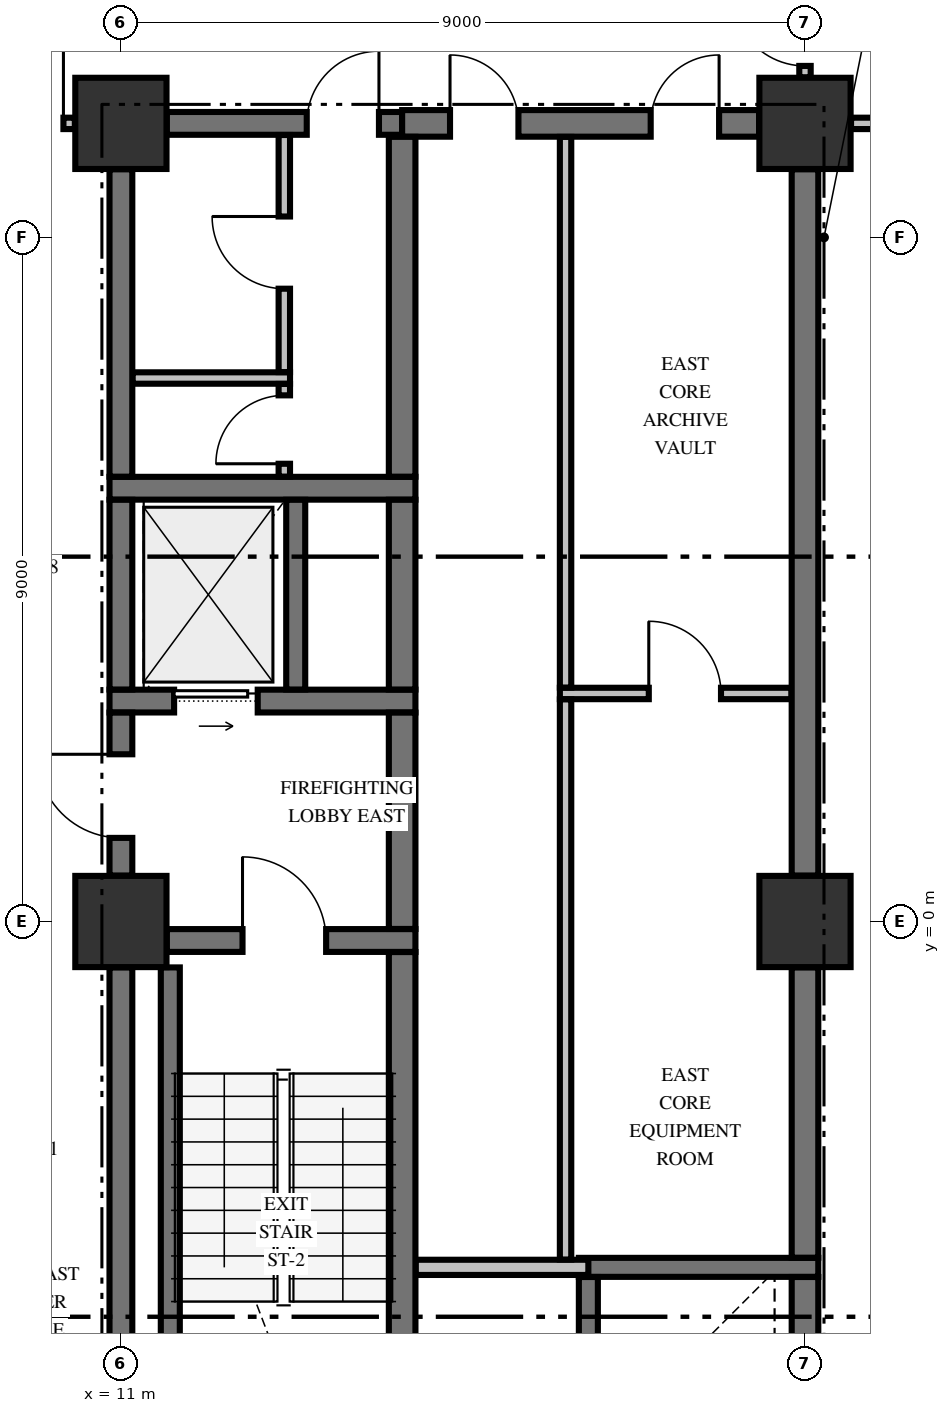
"""IFC4 building model, lengths in metres.
Left out: names, types, materials, properties, quantities, classifications, styles, units other than length and angle.
Written with IfcOpenShell. Run it as: python <this file> out.ifc"""

import sys

from ifc_helpers import new_model, si_unit, direction, frame, frame_2d, origin, origin_2d, place, context, subcontext, project, spatial, rectangle, extrude, element, fill, save


model = new_model("IFC4")
c1 = context("Model", 3, precision=1e-05, world=origin(), true_north=direction((0.0, 1.0)))
c2 = subcontext(c1, "Body", "Model", "MODEL_VIEW")
j1 = project(units=[si_unit("LENGTHUNIT", "METRE"), si_unit("PLANEANGLEUNIT", "RADIAN")], contexts=[c1])
p1 = place(None, origin())
s1 = spatial("IfcSite", under=j1, at=p1, CompositionType="ELEMENT")
p2 = place(p1, origin())
s2 = spatial("IfcBuilding", under=s1, at=p2, CompositionType="ELEMENT")
p3 = place(p2, frame((0.0, 0.0, 27.2)))
s3 = spatial("IfcBuildingStorey", under=s2, at=p3, CompositionType="ELEMENT", Elevation=27.2)
for number, where, z_axis, x_axis in (
    (1, (11.0, 0.0, -0.45), (0.0, 0.0, 1.0), (1.0, 0.0, 0.0)),
    (2, (11.0, 10.5, -0.45), (0.0, 0.0, 1.0), (1.0, 0.0, 0.0)),
    (3, (20.0, 10.5, -0.45), (0.0, 0.0, 1.0), (1.0, 0.0, 0.0)),
    (4, (20.0, 0.0, -0.45), (0.0, 0.0, 1.0), (1.0, 0.0, 0.0)),
):
    element("IfcColumn", number, at=place(p3, frame(where, z_axis=z_axis, x_axis=x_axis)), inside=s3, PredefinedType="COLUMN", context=c2, shape_type="SweptSolid", body=[
        extrude(rectangle(XDim=1.2, YDim=1.2, at=origin_2d()), origin(), (0.0, 0.0, 1.0), 3.77),
    ])
p4 = place(p3, frame((17.025, -4.55, 0.0), z_axis=(0.0, 0.0, 1.0), x_axis=(1.0, 0.0, 0.0)))
e5 = element("IfcWall", 5, at=p4, inside=s3, PredefinedType="SOLIDWALL", context=c2, shape_type="SweptSolid", body=[
    extrude(rectangle(XDim=3.15, YDim=0.25, at=frame_2d((1.575, 0.0))), origin(), (0.0, 0.0, 1.0), 3.32),
])
p5 = place(p3, frame((11.604, -0.25, 0.0), z_axis=(0.0, 0.0, 1.0), x_axis=(1.0, 0.0, 0.0)))
e6 = element("IfcWall", 6, at=p5, inside=s3, PredefinedType="SHEAR", context=c2, shape_type="SweptSolid", body=[
    extrude(rectangle(XDim=3.271, YDim=0.3, at=frame_2d((1.635, 0.0))), origin(), (0.0, 0.0, 1.0), 3.32),
])
p6 = place(p5, frame((0.996, 0.0, 0.0)))
e7 = element("IfcOpeningElement", 7, at=p6, cuts=e6, PredefinedType="OPENING", context=c2, shape_type="SweptSolid", body=[
    extrude(rectangle(XDim=1.1, YDim=2.15, at=frame_2d((0.55, 1.075))), frame((0.0, 0.16, 0.0), z_axis=(0.0, -1.0, 0.0), x_axis=(1.0, 0.0, 0.0)), (0.0, 0.0, 1.0), 0.32),
])
p7 = place(p3, frame((10.85, 2.9, 0.0), z_axis=(0.0, 0.0, 1.0), x_axis=(1.0, 0.0, 0.0)))
e8 = element("IfcWall", 8, at=p7, inside=s3, PredefinedType="SHEAR", context=c2, shape_type="SweptSolid", body=[
    extrude(rectangle(XDim=4.025, YDim=0.3, at=frame_2d((2.012, 0.0))), origin(), (0.0, 0.0, 1.0), 3.32),
])
p8 = place(p7, frame((0.85, 0.0, 0.0)))
e9 = element("IfcOpeningElement", 9, at=p8, cuts=e8, PredefinedType="OPENING", context=c2, shape_type="SweptSolid", body=[
    extrude(rectangle(XDim=1.1, YDim=2.2, at=frame_2d((0.55, 1.1))), frame((0.0, 0.16, 0.0), z_axis=(0.0, -1.0, 0.0), x_axis=(1.0, 0.0, 0.0)), (0.0, 0.0, 1.0), 0.32),
])
p9 = place(p3, frame((10.85, 5.7, 0.0), z_axis=(0.0, 0.0, 1.0), x_axis=(1.0, 0.0, 0.0)))
e10 = element("IfcWall", 10, at=p9, inside=s3, PredefinedType="SHEAR", context=c2, shape_type="SweptSolid", body=[
    extrude(rectangle(XDim=4.025, YDim=0.3, at=frame_2d((2.012, 0.0))), origin(), (0.0, 0.0, 1.0), 3.32),
])
p10 = place(p3, frame((11.604, 10.5, 0.0), z_axis=(0.0, 0.0, 1.0), x_axis=(1.0, 0.0, 0.0)))
e11 = element("IfcWall", 11, at=p10, inside=s3, PredefinedType="SHEAR", context=c2, shape_type="SweptSolid", body=[
    extrude(rectangle(XDim=3.096, YDim=0.3, at=frame_2d((1.548, 0.0))), origin(), (0.0, 0.0, 1.0), 3.32),
])
p11 = place(p10, frame((1.841, 0.0, 0.0)))
e12 = element("IfcOpeningElement", 12, at=p11, cuts=e11, PredefinedType="OPENING", context=c2, shape_type="SweptSolid", body=[
    extrude(rectangle(XDim=0.95, YDim=2.15, at=frame_2d((0.475, 1.075))), frame((0.0, 0.16, 0.0), z_axis=(0.0, -1.0, 0.0), x_axis=(1.0, 0.0, 0.0)), (0.0, 0.0, 1.0), 0.32),
])
p12 = place(p3, frame((14.7, 10.5, 0.0), z_axis=(0.0, 0.0, 1.0), x_axis=(1.0, 0.0, 0.0)))
e13 = element("IfcWall", 13, at=p12, inside=s3, PredefinedType="SHEAR", context=c2, shape_type="SweptSolid", body=[
    extrude(rectangle(XDim=4.696, YDim=0.35, at=frame_2d((2.348, 0.0))), origin(), (0.0, 0.0, 1.0), 3.32),
])
p13 = place(p12, frame((0.63, 0.0, 0.0)))
e14 = element("IfcOpeningElement", 14, at=p13, cuts=e13, PredefinedType="OPENING", context=c2, shape_type="SweptSolid", body=[
    extrude(rectangle(XDim=0.9, YDim=2.15, at=frame_2d((0.45, 1.075))), frame((0.0, 0.185, 0.0), z_axis=(0.0, -1.0, 0.0), x_axis=(1.0, 0.0, 0.0)), (0.0, 0.0, 1.0), 0.37),
])
p14 = place(p12, frame((3.27, 0.0, 0.0)))
e15 = element("IfcOpeningElement", 15, at=p14, cuts=e13, PredefinedType="OPENING", context=c2, shape_type="SweptSolid", body=[
    extrude(rectangle(XDim=0.9, YDim=2.15, at=frame_2d((0.45, 1.075))), frame((0.0, 0.185, 0.0), z_axis=(0.0, -1.0, 0.0), x_axis=(1.0, 0.0, 0.0)), (0.0, 0.0, 1.0), 0.37),
])
p15 = place(p3, frame((14.878, -4.55, 0.0), z_axis=(0.0, 0.0, 1.0), x_axis=(1.0, 0.0, 0.0)))
e16 = element("IfcWall", 16, at=p15, inside=s3, PredefinedType="PARTITIONING", context=c2, shape_type="SweptSolid", body=[
    extrude(rectangle(XDim=2.272, YDim=0.2, at=frame_2d((1.136, 0.0))), origin(), (0.0, 0.0, 1.0), 3.32),
])
p16 = place(p3, frame((16.775, 3.0, 0.0), z_axis=(0.0, 0.0, 1.0), x_axis=(1.0, 0.0, 0.0)))
e17 = element("IfcWall", 17, at=p16, inside=s3, PredefinedType="PARTITIONING", context=c2, shape_type="SweptSolid", body=[
    extrude(rectangle(XDim=3.047, YDim=0.15, at=frame_2d((1.523, 0.0))), origin(), (0.0, 0.0, 1.0), 3.32),
])
p17 = place(p16, frame((1.17, 0.0, 0.0)))
e18 = element("IfcOpeningElement", 18, at=p17, cuts=e17, PredefinedType="OPENING", context=c2, shape_type="SweptSolid", body=[
    extrude(rectangle(XDim=0.95, YDim=2.15, at=frame_2d((0.475, 1.075))), frame((0.0, 0.085, 0.0), z_axis=(0.0, -1.0, 0.0), x_axis=(1.0, 0.0, 0.0)), (0.0, 0.0, 1.0), 0.17),
])
p18 = place(p3, frame((11.153, 7.15, 0.0), z_axis=(0.0, 0.0, 1.0), x_axis=(1.0, 0.0, 0.0)))
e19 = element("IfcWall", 19, at=p18, inside=s3, PredefinedType="PARTITIONING", context=c2, shape_type="SweptSolid", body=[
    extrude(rectangle(XDim=2.072, YDim=0.15, at=frame_2d((1.036, 0.0))), origin(), (0.0, 0.0, 1.0), 3.32),
])
p19 = place(p3, frame((-10.394, 10.5, 0.0), z_axis=(0.0, 0.0, 1.0), x_axis=(1.0, 0.0, 0.0)))
e20 = element("IfcWall", 20, at=p19, inside=s3, PredefinedType="PARTITIONING", context=c2, shape_type="SweptSolid", body=[
    extrude(rectangle(XDim=20.788, YDim=0.15, at=frame_2d((10.394, 0.0))), origin(), (0.0, 0.0, 1.0), 3.32),
])
p20 = place(p19, frame((0.15, 0.0, 0.0)))
e21 = element("IfcOpeningElement", 21, at=p20, cuts=e20, PredefinedType="OPENING", context=c2, shape_type="SweptSolid", body=[
    extrude(rectangle(XDim=1.05, YDim=2.15, at=frame_2d((0.525, 1.075))), frame((0.0, 0.085, 0.0), z_axis=(0.0, -1.0, 0.0), x_axis=(1.0, 0.0, 0.0)), (0.0, 0.0, 1.0), 0.17),
])
p21 = place(p19, frame((19.588, 0.0, 0.0)))
e22 = element("IfcOpeningElement", 22, at=p21, cuts=e20, PredefinedType="OPENING", context=c2, shape_type="SweptSolid", body=[
    extrude(rectangle(XDim=1.05, YDim=2.15, at=frame_2d((0.525, 1.075))), frame((0.0, 0.085, 0.0), z_axis=(0.0, -1.0, 0.0), x_axis=(1.0, 0.0, 0.0)), (0.0, 0.0, 1.0), 0.17),
])
p22 = place(p3, frame((20.606, 10.5, 0.0), z_axis=(0.0, 0.0, 1.0), x_axis=(1.0, 0.0, 0.0)))
e23 = element("IfcWall", 23, at=p22, inside=s3, PredefinedType="PARTITIONING", context=c2, shape_type="SweptSolid", body=[
    extrude(rectangle(XDim=8.229, YDim=0.15, at=frame_2d((4.115, 0.0))), origin(), (0.0, 0.0, 1.0), 3.32),
])
p23 = place(p22, frame((3.394, 0.0, 0.0)))
e24 = element("IfcOpeningElement", 24, at=p23, cuts=e23, PredefinedType="OPENING", context=c2, shape_type="SweptSolid", body=[
    extrude(rectangle(XDim=1.0, YDim=2.15, at=frame_2d((0.5, 1.075))), frame((0.0, 0.085, 0.0), z_axis=(0.0, -1.0, 0.0), x_axis=(1.0, 0.0, 0.0)), (0.0, 0.0, 1.0), 0.17),
])
p24 = place(p3, frame((11.0, -9.346, 0.0), z_axis=(0.0, 0.0, 1.0), x_axis=(0.0, 1.0, 0.0)))
e25 = element("IfcWall", 25, at=p24, inside=s3, PredefinedType="SHEAR", context=c2, shape_type="SweptSolid", body=[
    extrude(rectangle(XDim=8.742, YDim=0.3, at=frame_2d((4.371, 0.0))), origin(), (0.0, 0.0, 1.0), 3.32),
])
p25 = place(p3, frame((11.0, 0.604, 0.0), z_axis=(0.0, 0.0, 1.0), x_axis=(0.0, 1.0, 0.0)))
e26 = element("IfcWall", 26, at=p25, inside=s3, PredefinedType="SHEAR", context=c2, shape_type="SweptSolid", body=[
    extrude(rectangle(XDim=2.144, YDim=0.3, at=frame_2d((1.072, 0.0))), origin(), (0.0, 0.0, 1.0), 3.32),
])
p26 = place(p25, frame((0.496, 0.0, 0.0)))
e27 = element("IfcOpeningElement", 27, at=p26, cuts=e26, PredefinedType="OPENING", context=c2, shape_type="SweptSolid", body=[
    extrude(rectangle(XDim=1.1, YDim=2.15, at=frame_2d((0.55, 1.075))), frame((0.0, 0.16, 0.0), z_axis=(0.0, -1.0, 0.0), x_axis=(1.0, 0.0, 0.0)), (0.0, 0.0, 1.0), 0.32),
])
p27 = place(p3, frame((11.0, 3.052, 0.0), z_axis=(0.0, 0.0, 1.0), x_axis=(0.0, 1.0, 0.0)))
e28 = element("IfcWall", 28, at=p27, inside=s3, PredefinedType="SHEAR", context=c2, shape_type="SweptSolid", body=[
    extrude(rectangle(XDim=2.496, YDim=0.3, at=frame_2d((1.248, 0.0))), origin(), (0.0, 0.0, 1.0), 3.32),
])
p28 = place(p3, frame((11.0, 5.852, 0.0), z_axis=(0.0, 0.0, 1.0), x_axis=(0.0, 1.0, 0.0)))
e29 = element("IfcWall", 29, at=p28, inside=s3, PredefinedType="SHEAR", context=c2, shape_type="SweptSolid", body=[
    extrude(rectangle(XDim=4.044, YDim=0.3, at=frame_2d((2.022, 0.0))), origin(), (0.0, 0.0, 1.0), 3.32),
])
p29 = place(p3, frame((11.65, -9.346, 0.0), z_axis=(0.0, 0.0, 1.0), x_axis=(0.0, 1.0, 0.0)))
e30 = element("IfcWall", 30, at=p29, inside=s3, PredefinedType="SOLIDWALL", context=c2, shape_type="SweptSolid", body=[
    extrude(rectangle(XDim=8.742, YDim=0.25, at=frame_2d((4.371, 0.0))), origin(), (0.0, 0.0, 1.0), 3.32),
])
p30 = place(p3, frame((13.3, 3.052, 0.0), z_axis=(0.0, 0.0, 1.0), x_axis=(0.0, 1.0, 0.0)))
e31 = element("IfcWall", 31, at=p30, inside=s3, PredefinedType="SOLIDWALL", context=c2, shape_type="SweptSolid", body=[
    extrude(rectangle(XDim=2.496, YDim=0.25, at=frame_2d((1.248, 0.0))), origin(), (0.0, 0.0, 1.0), 3.32),
])
p31 = place(p3, frame((14.7, -9.773, 0.0), z_axis=(0.0, 0.0, 1.0), x_axis=(0.0, 1.0, 0.0)))
e32 = element("IfcWall", 32, at=p31, inside=s3, PredefinedType="SHEAR", context=c2, shape_type="SweptSolid", body=[
    extrude(rectangle(XDim=9.371, YDim=0.35, at=frame_2d((4.686, 0.0))), origin(), (0.0, 0.0, 1.0), 3.32),
])
p32 = place(p3, frame((14.7, -0.098, 0.0), z_axis=(0.0, 0.0, 1.0), x_axis=(0.0, 1.0, 0.0)))
e33 = element("IfcWall", 33, at=p32, inside=s3, PredefinedType="SHEAR", context=c2, shape_type="SweptSolid", body=[
    extrude(rectangle(XDim=2.846, YDim=0.35, at=frame_2d((1.423, 0.0))), origin(), (0.0, 0.0, 1.0), 3.32),
])
p33 = place(p3, frame((14.7, 3.052, 0.0), z_axis=(0.0, 0.0, 1.0), x_axis=(0.0, 1.0, 0.0)))
e34 = element("IfcWall", 34, at=p33, inside=s3, PredefinedType="SHEAR", context=c2, shape_type="SweptSolid", body=[
    extrude(rectangle(XDim=2.496, YDim=0.35, at=frame_2d((1.248, 0.0))), origin(), (0.0, 0.0, 1.0), 3.32),
])
p34 = place(p3, frame((14.7, 5.852, 0.0), z_axis=(0.0, 0.0, 1.0), x_axis=(0.0, 1.0, 0.0)))
e35 = element("IfcWall", 35, at=p34, inside=s3, PredefinedType="SHEAR", context=c2, shape_type="SweptSolid", body=[
    extrude(rectangle(XDim=4.471, YDim=0.35, at=frame_2d((2.235, 0.0))), origin(), (0.0, 0.0, 1.0), 3.32),
])
p35 = place(p3, frame((17.15, -6.923, 0.0), z_axis=(0.0, 0.0, 1.0), x_axis=(0.0, 1.0, 0.0)))
e36 = element("IfcWall", 36, at=p35, inside=s3, PredefinedType="SOLIDWALL", context=c2, shape_type="SweptSolid", body=[
    extrude(rectangle(XDim=2.246, YDim=0.25, at=frame_2d((1.123, 0.0))), origin(), (0.0, 0.0, 1.0), 3.32),
])
p36 = place(p3, frame((20.0, -6.923, 0.0), z_axis=(0.0, 0.0, 1.0), x_axis=(0.0, 1.0, 0.0)))
e37 = element("IfcWall", 37, at=p36, inside=s3, PredefinedType="SHEAR", context=c2, shape_type="SweptSolid", body=[
    extrude(rectangle(XDim=2.246, YDim=0.35, at=frame_2d((1.123, 0.0))), origin(), (0.0, 0.0, 1.0), 3.32),
])
p37 = place(p3, frame((20.0, -4.423, 0.0), z_axis=(0.0, 0.0, 1.0), x_axis=(0.0, 1.0, 0.0)))
e38 = element("IfcWall", 38, at=p37, inside=s3, PredefinedType="SHEAR", context=c2, shape_type="SweptSolid", body=[
    extrude(rectangle(XDim=3.819, YDim=0.35, at=frame_2d((1.91, 0.0))), origin(), (0.0, 0.0, 1.0), 3.32),
])
p38 = place(p3, frame((20.0, 0.604, 0.0), z_axis=(0.0, 0.0, 1.0), x_axis=(0.0, 1.0, 0.0)))
e39 = element("IfcWall", 39, at=p38, inside=s3, PredefinedType="SHEAR", context=c2, shape_type="SweptSolid", body=[
    extrude(rectangle(XDim=9.292, YDim=0.35, at=frame_2d((4.646, 0.0))), origin(), (0.0, 0.0, 1.0), 3.32),
])
p39 = place(p3, frame((13.15, 5.853, 0.0), z_axis=(0.0, 0.0, 1.0), x_axis=(0.0, 1.0, 0.0)))
e40 = element("IfcWall", 40, at=p39, inside=s3, PredefinedType="PARTITIONING", context=c2, shape_type="SweptSolid", body=[
    extrude(rectangle(XDim=1.219, YDim=0.15, at=frame_2d((0.609, 0.0))), origin(), (0.0, 0.0, 1.0), 3.32),
])
p40 = place(p39, frame((0.169, 0.0, 0.0)))
e41 = element("IfcOpeningElement", 41, at=p40, cuts=e40, PredefinedType="OPENING", context=c2, shape_type="SweptSolid", body=[
    extrude(rectangle(XDim=0.9, YDim=2.15, at=frame_2d((0.45, 1.075))), frame((0.0, 0.085, 0.0), z_axis=(0.0, -1.0, 0.0), x_axis=(1.0, 0.0, 0.0)), (0.0, 0.0, 1.0), 0.17),
])
p41 = place(p3, frame((13.15, 7.228, 0.0), z_axis=(0.0, 0.0, 1.0), x_axis=(0.0, 1.0, 0.0)))
e42 = element("IfcWall", 42, at=p41, inside=s3, PredefinedType="PARTITIONING", context=c2, shape_type="SweptSolid", body=[
    extrude(rectangle(XDim=3.119, YDim=0.15, at=frame_2d((1.56, 0.0))), origin(), (0.0, 0.0, 1.0), 3.32),
])
p42 = place(p41, frame((1.097, 0.0, 0.0)))
e43 = element("IfcOpeningElement", 43, at=p42, cuts=e42, PredefinedType="OPENING", context=c2, shape_type="SweptSolid", body=[
    extrude(rectangle(XDim=0.95, YDim=2.15, at=frame_2d((0.475, 1.075))), frame((0.0, 0.085, 0.0), z_axis=(0.0, -1.0, 0.0), x_axis=(1.0, 0.0, 0.0)), (0.0, 0.0, 1.0), 0.17),
])
p43 = place(p3, frame((16.85, -4.447, 0.0), z_axis=(0.0, 0.0, 1.0), x_axis=(0.0, 1.0, 0.0)))
e44 = element("IfcWall", 44, at=p43, inside=s3, PredefinedType="PARTITIONING", context=c2, shape_type="SweptSolid", body=[
    extrude(rectangle(XDim=7.369, YDim=0.15, at=frame_2d((3.685, 0.0))), origin(), (0.0, 0.0, 1.0), 3.32),
])
p44 = place(p3, frame((16.85, 3.078, 0.0), z_axis=(0.0, 0.0, 1.0), x_axis=(0.0, 1.0, 0.0)))
e45 = element("IfcWall", 45, at=p44, inside=s3, PredefinedType="PARTITIONING", context=c2, shape_type="SweptSolid", body=[
    extrude(rectangle(XDim=7.244, YDim=0.15, at=frame_2d((3.622, 0.0))), origin(), (0.0, 0.0, 1.0), 3.32),
])
p45 = place(p3, frame((20.0, 11.106, 0.0), z_axis=(0.0, 0.0, 1.0), x_axis=(0.0, 1.0, 0.0)))
e46 = element("IfcWall", 46, at=p45, inside=s3, PredefinedType="PARTITIONING", context=c2, shape_type="SweptSolid", body=[
    extrude(rectangle(XDim=1.366, YDim=0.15, at=frame_2d((0.683, 0.0))), origin(), (0.0, 0.0, 1.0), 2.66),
])
p46 = place(p45, frame((0.15, 0.0, 0.0)))
e47 = element("IfcOpeningElement", 47, at=p46, cuts=e46, PredefinedType="OPENING", context=c2, shape_type="SweptSolid", body=[
    extrude(rectangle(XDim=0.95, YDim=2.15, at=frame_2d((0.475, 1.075))), frame((0.0, 0.085, 0.0), z_axis=(0.0, -1.0, 0.0), x_axis=(1.0, 0.0, 0.0)), (0.0, 0.0, 1.0), 0.17),
])
p47 = place(p6, origin())
e48 = element("IfcDoor", 48, at=p47, inside=s3, OperationType="SINGLE_SWING_LEFT", PredefinedType="DOOR", context=c2, shape_type="SweptSolid", body=[
    extrude(rectangle(XDim=1.1, YDim=2.15, at=frame_2d((0.55, 1.075))), frame((0.0, 0.025, 0.0), z_axis=(0.0, -1.0, 0.0), x_axis=(1.0, 0.0, 0.0)), (0.0, 0.0, 1.0), 0.05),
])
fill(e7, e48)
p48 = place(p26, origin())
e49 = element("IfcDoor", 49, at=p48, inside=s3, OperationType="SINGLE_SWING_RIGHT", PredefinedType="DOOR", context=c2, shape_type="SweptSolid", body=[
    extrude(rectangle(XDim=1.1, YDim=2.15, at=frame_2d((0.55, 1.075))), frame((0.0, 0.025, 0.0), z_axis=(0.0, -1.0, 0.0), x_axis=(1.0, 0.0, 0.0)), (0.0, 0.0, 1.0), 0.05),
])
fill(e27, e49)
p49 = place(p8, origin())
e50 = element("IfcDoor", 50, at=p49, inside=s3, OperationType="SLIDING_TO_RIGHT", PredefinedType="DOOR", context=c2, shape_type="SweptSolid", body=[
    extrude(rectangle(XDim=1.1, YDim=2.2, at=frame_2d((0.55, 1.1))), frame((0.0, 0.025, 0.0), z_axis=(0.0, -1.0, 0.0), x_axis=(1.0, 0.0, 0.0)), (0.0, 0.0, 1.0), 0.05),
])
fill(e9, e50)
p50 = place(p11, origin())
e51 = element("IfcDoor", 51, at=p50, inside=s3, OperationType="SINGLE_SWING_RIGHT", PredefinedType="DOOR", context=c2, shape_type="SweptSolid", body=[
    extrude(rectangle(XDim=0.95, YDim=2.15, at=frame_2d((0.475, 1.075))), frame((0.0, 0.025, 0.0), z_axis=(0.0, -1.0, 0.0), x_axis=(1.0, 0.0, 0.0)), (0.0, 0.0, 1.0), 0.05),
])
fill(e12, e51)
p51 = place(p40, origin())
e52 = element("IfcDoor", 52, at=p51, inside=s3, OperationType="SINGLE_SWING_LEFT", PredefinedType="DOOR", context=c2, shape_type="SweptSolid", body=[
    extrude(rectangle(XDim=0.9, YDim=2.15, at=frame_2d((0.45, 1.075))), frame((0.0, 0.025, 0.0), z_axis=(0.0, -1.0, 0.0), x_axis=(1.0, 0.0, 0.0)), (0.0, 0.0, 1.0), 0.05),
])
fill(e41, e52)
p52 = place(p42, origin())
e53 = element("IfcDoor", 53, at=p52, inside=s3, OperationType="SINGLE_SWING_RIGHT", PredefinedType="DOOR", context=c2, shape_type="SweptSolid", body=[
    extrude(rectangle(XDim=0.95, YDim=2.15, at=frame_2d((0.475, 1.075))), frame((0.0, 0.025, 0.0), z_axis=(0.0, -1.0, 0.0), x_axis=(1.0, 0.0, 0.0)), (0.0, 0.0, 1.0), 0.05),
])
fill(e43, e53)
p53 = place(p13, origin())
e54 = element("IfcDoor", 54, at=p53, inside=s3, OperationType="SINGLE_SWING_LEFT", PredefinedType="DOOR", context=c2, shape_type="SweptSolid", body=[
    extrude(rectangle(XDim=0.9, YDim=2.15, at=frame_2d((0.45, 1.075))), frame((0.0, 0.025, 0.0), z_axis=(0.0, -1.0, 0.0), x_axis=(1.0, 0.0, 0.0)), (0.0, 0.0, 1.0), 0.05),
])
fill(e14, e54)
p54 = place(p14, origin())
e55 = element("IfcDoor", 55, at=p54, inside=s3, OperationType="SINGLE_SWING_RIGHT", PredefinedType="DOOR", context=c2, shape_type="SweptSolid", body=[
    extrude(rectangle(XDim=0.9, YDim=2.15, at=frame_2d((0.45, 1.075))), frame((0.0, 0.025, 0.0), z_axis=(0.0, -1.0, 0.0), x_axis=(1.0, 0.0, 0.0)), (0.0, 0.0, 1.0), 0.05),
])
fill(e15, e55)
p55 = place(p17, origin())
e56 = element("IfcDoor", 56, at=p55, inside=s3, OperationType="SINGLE_SWING_LEFT", PredefinedType="DOOR", context=c2, shape_type="SweptSolid", body=[
    extrude(rectangle(XDim=0.95, YDim=2.15, at=frame_2d((0.475, 1.075))), frame((0.0, 0.025, 0.0), z_axis=(0.0, -1.0, 0.0), x_axis=(1.0, 0.0, 0.0)), (0.0, 0.0, 1.0), 0.05),
])
fill(e18, e56)
p56 = place(p21, origin())
e57 = element("IfcDoor", 57, at=p56, inside=s3, OperationType="SINGLE_SWING_RIGHT", PredefinedType="DOOR", context=c2, shape_type="SweptSolid", body=[
    extrude(rectangle(XDim=1.05, YDim=2.15, at=frame_2d((0.525, 1.075))), frame((0.0, 0.025, 0.0), z_axis=(0.0, -1.0, 0.0), x_axis=(1.0, 0.0, 0.0)), (0.0, 0.0, 1.0), 0.05),
])
fill(e22, e57)
p57 = place(p46, origin())
e58 = element("IfcDoor", 58, at=p57, inside=s3, OperationType="SINGLE_SWING_RIGHT", PredefinedType="DOOR", context=c2, shape_type="SweptSolid", body=[
    extrude(rectangle(XDim=0.95, YDim=2.15, at=frame_2d((0.475, 1.075))), frame((0.0, 0.025, 0.0), z_axis=(0.0, -1.0, 0.0), x_axis=(1.0, 0.0, 0.0)), (0.0, 0.0, 1.0), 0.05),
])
fill(e47, e58)
save(model, sys.argv[1])
